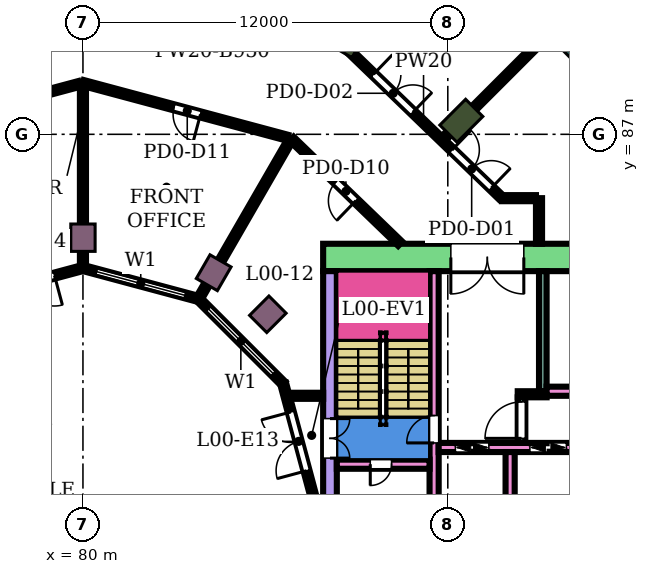
"""IFC4 building model, lengths in metres.
Left out: names, types, materials, properties, quantities, classifications, styles, units other than length and angle.
Written with IfcOpenShell. Run it as: python <this file> out.ifc"""

import sys

from ifc_helpers import new_model, si_unit, direction, frame, frame_2d, origin, origin_2d, place, context, subcontext, project, spatial, rectangle, extrude, element, fill, save


model = new_model("IFC4")
c1 = context("Model", 3, precision=1e-05, world=origin(), true_north=direction((0.0, 1.0)))
c2 = subcontext(c1, "Body", "Model", "MODEL_VIEW")
j1 = project(units=[si_unit("LENGTHUNIT", "METRE"), si_unit("PLANEANGLEUNIT", "RADIAN")], contexts=[c1])
p1 = place(None, origin())
s1 = spatial("IfcSite", under=j1, at=p1, CompositionType="ELEMENT")
p2 = place(p1, origin())
s2 = spatial("IfcBuilding", under=s1, at=p2, CompositionType="ELEMENT")
p3 = place(p2, origin())
s3 = spatial("IfcBuildingStorey", under=s2, at=p3, CompositionType="ELEMENT", Elevation=0.0)
for number, where, z_axis, x_axis in (
    (1, (92.445, 87.445, 0.0), (0.0, 0.0, 1.0), (0.707, 0.707, 0.0)),
    (2, (88.8, 90.242, 0.0), (0.0, 0.0, 1.0), (0.5, 0.866, 0.0)),
):
    element("IfcColumn", number, at=place(p3, frame(where, z_axis=z_axis, x_axis=x_axis)), inside=s3, PredefinedType="COLUMN", context=c2, shape_type="SweptSolid", body=[
        extrude(rectangle(XDim=1.2, YDim=0.8, at=origin_2d()), origin(), (0.0, 0.0, 1.0), 7.0),
    ])
for number, where, z_axis, x_axis in (
    (3, (86.081, 81.081, 0.0), (0.0, 0.0, 1.0), (0.707, 0.707, 0.0)),
    (4, (84.3, 82.448, 0.0), (0.0, 0.0, 1.0), (0.5, 0.866, 0.0)),
    (5, (80.0, 83.6, 0.0), (0.0, 0.0, 1.0), (0.0, 1.0, 0.0)),
):
    element("IfcColumn", number, at=place(p3, frame(where, z_axis=z_axis, x_axis=x_axis)), inside=s3, PredefinedType="COLUMN", context=c2, shape_type="SweptSolid", body=[
        extrude(rectangle(XDim=0.9, YDim=0.8, at=origin_2d()), origin(), (0.0, 0.0, 1.0), 7.0),
    ])
p4 = place(p3, frame((95.91, 90.91, 0.0), z_axis=(0.0, 0.0, 1.0), x_axis=(0.707106781187, 0.707106781187, 0.0)))
e6 = element("IfcColumn", 6, at=p4, inside=s3, PredefinedType="COLUMN", context=c2, shape_type="SweptSolid", body=[
    extrude(rectangle(XDim=1.8, YDim=2.4, at=origin_2d()), origin(), (0.0, 0.0, 1.0), 7.0),
])
p5 = place(p3, frame((87.9, 82.95, 0.0), z_axis=(0.0, 0.0, 1.0), x_axis=(1.0, 0.0, 0.0)))
e7 = element("IfcWall", 7, at=p5, inside=s3, PredefinedType="SHEAR", context=c2, shape_type="SweptSolid", body=[
    extrude(rectangle(XDim=14.6, YDim=0.9, at=frame_2d((7.3, 0.0))), origin(), (0.0, 0.0, 1.0), 6.55),
])
p6 = place(p5, frame((4.2, 0.0, 0.0)))
e8 = element("IfcOpeningElement", 8, at=p6, cuts=e7, PredefinedType="OPENING", context=c2, shape_type="SweptSolid", body=[
    extrude(rectangle(XDim=2.4, YDim=2.4, at=frame_2d((1.2, 1.2))), frame((0.0, 0.46, 0.0), z_axis=(0.0, -1.0, 0.0), x_axis=(1.0, 0.0, 0.0)), (0.0, 0.0, 1.0), 0.92),
])
p7 = place(p3, frame((88.125, 75.0, 0.0), z_axis=(0.0, 0.0, 1.0), x_axis=(0.0, 1.0, 0.0)))
e9 = element("IfcWall", 9, at=p7, inside=s3, PredefinedType="SHEAR", context=c2, shape_type="SweptSolid", body=[
    extrude(rectangle(XDim=7.5, YDim=0.45, at=frame_2d((3.75, 0.0))), origin(), (0.0, 0.0, 1.0), 6.55),
])
p8 = place(p7, frame((1.35, 0.0, 0.0)))
e10 = element("IfcOpeningElement", 10, at=p8, cuts=e9, PredefinedType="OPENING", context=c2, shape_type="SweptSolid", body=[
    extrude(rectangle(XDim=1.3, YDim=2.4, at=frame_2d((0.65, 1.2))), frame((0.0, 0.235, 0.0), z_axis=(0.0, -1.0, 0.0), x_axis=(1.0, 0.0, 0.0)), (0.0, 0.0, 1.0), 0.47),
])
p9 = place(p3, frame((91.55, 75.0, 0.0), z_axis=(0.0, 0.0, 1.0), x_axis=(0.0, 1.0, 0.0)))
e11 = element("IfcWall", 11, at=p9, inside=s3, PredefinedType="SHEAR", context=c2, shape_type="SweptSolid", body=[
    extrude(rectangle(XDim=7.5, YDim=0.3, at=frame_2d((3.75, 0.0))), origin(), (0.0, 0.0, 1.0), 6.55),
])
p10 = place(p9, frame((1.85, 0.0, 0.0)))
e12 = element("IfcOpeningElement", 12, at=p10, cuts=e11, PredefinedType="OPENING", context=c2, shape_type="SweptSolid", body=[
    extrude(rectangle(XDim=0.9, YDim=2.1, at=frame_2d((0.45, 1.05))), frame((0.0, 0.16, 0.0), z_axis=(0.0, -1.0, 0.0), x_axis=(1.0, 0.0, 0.0)), (0.0, 0.0, 1.0), 0.32),
])
p11 = place(p3, frame((88.35, 76.15, 0.0), z_axis=(0.0, 0.0, 1.0), x_axis=(1.0, 0.0, 0.0)))
e13 = element("IfcWall", 13, at=p11, inside=s3, PredefinedType="SHEAR", context=c2, shape_type="SweptSolid", body=[
    extrude(rectangle(XDim=3.05, YDim=0.3, at=frame_2d((1.525, 0.0))), origin(), (0.0, 0.0, 1.0), 6.55),
])
p12 = place(p11, frame((1.1, 0.0, 0.0)))
e14 = element("IfcOpeningElement", 14, at=p12, cuts=e13, PredefinedType="OPENING", context=c2, shape_type="SweptSolid", body=[
    extrude(rectangle(XDim=0.7, YDim=2.0, at=frame_2d((0.35, 1.0))), frame((0.0, 0.16, 0.0), z_axis=(0.0, -1.0, 0.0), x_axis=(1.0, 0.0, 0.0)), (0.0, 0.0, 1.0), 0.32),
])
p13 = place(p3, frame((91.7, 76.7, 0.0), z_axis=(0.0, 0.0, 1.0), x_axis=(1.0, 0.0, 0.0)))
e15 = element("IfcWall", 15, at=p13, inside=s3, PredefinedType="SHEAR", context=c2, shape_type="SweptSolid", body=[
    extrude(rectangle(XDim=10.8, YDim=0.3, at=frame_2d((5.4, 0.0))), origin(), (0.0, 0.0, 1.0), 6.55),
])
p14 = place(p13, frame((0.55, 0.0, 0.0)))
e16 = element("IfcOpeningElement", 16, at=p14, cuts=e15, PredefinedType="OPENING", context=c2, shape_type="SweptSolid", body=[
    extrude(rectangle(XDim=1.1, YDim=2.1, at=frame_2d((0.55, 1.05))), frame((0.0, 0.16, 0.0), z_axis=(0.0, -1.0, 0.0), x_axis=(1.0, 0.0, 0.0)), (0.0, 0.0, 1.0), 0.32),
])
p15 = place(p13, frame((3.0, 0.0, 0.0)))
e17 = element("IfcOpeningElement", 17, at=p15, cuts=e15, PredefinedType="OPENING", context=c2, shape_type="SweptSolid", body=[
    extrude(rectangle(XDim=1.2, YDim=2.1, at=frame_2d((0.6, 1.05))), frame((0.0, 0.16, 0.0), z_axis=(0.0, -1.0, 0.0), x_axis=(1.0, 0.0, 0.0)), (0.0, 0.0, 1.0), 0.32),
])
p16 = place(p13, frame((5.5, 0.0, 0.0)))
e18 = element("IfcOpeningElement", 18, at=p16, cuts=e15, PredefinedType="OPENING", context=c2, shape_type="SweptSolid", body=[
    extrude(rectangle(XDim=1.2, YDim=2.1, at=frame_2d((0.6, 1.05))), frame((0.0, 0.16, 0.0), z_axis=(0.0, -1.0, 0.0), x_axis=(1.0, 0.0, 0.0)), (0.0, 0.0, 1.0), 0.32),
])
p17 = place(p13, frame((8.1, 0.0, 0.0)))
e19 = element("IfcOpeningElement", 19, at=p17, cuts=e15, PredefinedType="OPENING", context=c2, shape_type="SweptSolid", body=[
    extrude(rectangle(XDim=1.0, YDim=2.1, at=frame_2d((0.5, 1.05))), frame((0.0, 0.16, 0.0), z_axis=(0.0, -1.0, 0.0), x_axis=(1.0, 0.0, 0.0)), (0.0, 0.0, 1.0), 0.32),
])
p18 = place(p3, frame((94.05, 74.0, 0.0), z_axis=(0.0, 0.0, 1.0), x_axis=(0.0, 1.0, 0.0)))
e20 = element("IfcWall", 20, at=p18, inside=s3, PredefinedType="SHEAR", context=c2, shape_type="SweptSolid", body=[
    extrude(rectangle(XDim=2.55, YDim=0.3, at=frame_2d((1.275, 0.0))), origin(), (0.0, 0.0, 1.0), 6.55),
])
p19 = place(p3, frame((95.125, 78.55, 0.0), z_axis=(0.0, 0.0, 1.0), x_axis=(0.0, 1.0, 0.0)))
e21 = element("IfcWall", 21, at=p19, inside=s3, PredefinedType="SHEAR", context=c2, shape_type="SweptSolid", body=[
    extrude(rectangle(XDim=3.95, YDim=0.25, at=frame_2d((1.975, 0.0))), origin(), (0.0, 0.0, 1.0), 6.55),
])
p20 = place(p3, frame((94.3, 78.45, 0.0), z_axis=(0.0, 0.0, 1.0), x_axis=(1.0, 0.0, 0.0)))
e22 = element("IfcWall", 22, at=p20, inside=s3, PredefinedType="SHEAR", context=c2, shape_type="SweptSolid", body=[
    extrude(rectangle(XDim=0.95, YDim=0.2, at=frame_2d((0.475, 0.0))), origin(), (0.0, 0.0, 1.0), 6.55),
])
p21 = place(p3, frame((94.425, 76.85, 0.0), z_axis=(0.0, 0.0, 1.0), x_axis=(0.0, 1.0, 0.0)))
e23 = element("IfcWall", 23, at=p21, inside=s3, PredefinedType="SHEAR", context=c2, shape_type="SweptSolid", body=[
    extrude(rectangle(XDim=1.5, YDim=0.25, at=frame_2d((0.75, 0.0))), origin(), (0.0, 0.0, 1.0), 6.55),
])
p22 = place(p21, frame((0.15, 0.0, 0.0)))
e24 = element("IfcOpeningElement", 24, at=p22, cuts=e23, PredefinedType="OPENING", context=c2, shape_type="SweptSolid", body=[
    extrude(rectangle(XDim=1.2, YDim=2.1, at=frame_2d((0.6, 1.05))), frame((0.0, 0.135, 0.0), z_axis=(0.0, -1.0, 0.0), x_axis=(1.0, 0.0, 0.0)), (0.0, 0.0, 1.0), 0.27),
])
p23 = place(p3, frame((95.25, 78.55, 0.0), z_axis=(0.0, 0.0, 1.0), x_axis=(1.0, 0.0, 0.0)))
e25 = element("IfcWall", 25, at=p23, inside=s3, PredefinedType="SHEAR", context=c2, shape_type="SweptSolid", body=[
    extrude(rectangle(XDim=7.25, YDim=0.3, at=frame_2d((3.625, 0.0))), origin(), (0.0, 0.0, 1.0), 6.55),
])
p24 = place(p23, frame((3.35, 0.0, 0.0)))
e26 = element("IfcOpeningElement", 26, at=p24, cuts=e25, PredefinedType="OPENING", context=c2, shape_type="SweptSolid", body=[
    extrude(rectangle(XDim=0.9, YDim=2.1, at=frame_2d((0.45, 1.05))), frame((0.0, 0.16, 0.0), z_axis=(0.0, -1.0, 0.0), x_axis=(1.0, 0.0, 0.0)), (0.0, 0.0, 1.0), 0.32),
])
p25 = place(p3, frame((87.604, 75.0, 0.0), z_axis=(0.0, 0.0, 1.0), x_axis=(-0.258789828301, 0.965933654434, 0.0)))
e27 = element("IfcWall", 27, at=p25, inside=s3, PredefinedType="NOTDEFINED", context=c2, shape_type="SweptSolid", body=[
    extrude(rectangle(XDim=3.936, YDim=0.2, at=frame_2d((1.968, 0.0))), origin(), (0.0, 0.0, 1.0), 7.0),
])
p26 = place(p25, frame((0.968, 0.0, 0.0)))
e28 = element("IfcOpeningElement", 28, at=p26, cuts=e27, PredefinedType="OPENING", context=c2, shape_type="SweptSolid", body=[
    extrude(rectangle(XDim=2.0, YDim=2.4, at=frame_2d((1.0, 1.2))), frame((0.0, 0.11, 0.0), z_axis=(0.0, -1.0, 0.0), x_axis=(1.0, 0.0, 0.0)), (0.0, 0.0, 1.0), 0.22),
])
p27 = place(p3, frame((86.585, 78.802, 0.0), z_axis=(0.0, 0.0, 1.0), x_axis=(-0.707106781187, 0.707106781187, 0.0)))
e29 = element("IfcWall", 29, at=p27, inside=s3, PredefinedType="NOTDEFINED", context=c2, shape_type="SweptSolid", body=[
    extrude(rectangle(XDim=3.936, YDim=0.2, at=frame_2d((1.968, 0.0))), origin(), (0.0, 0.0, 1.0), 7.0),
])
p28 = place(p27, frame((0.468, 0.0, 0.9)))
e30 = element("IfcOpeningElement", 30, at=p28, cuts=e29, PredefinedType="OPENING", context=c2, shape_type="SweptSolid", body=[
    extrude(rectangle(XDim=3.0, YDim=2.3, at=frame_2d((1.5, 1.15))), frame((0.0, 0.11, 0.0), z_axis=(0.0, -1.0, 0.0), x_axis=(1.0, 0.0, 0.0)), (0.0, 0.0, 1.0), 0.22),
])
p29 = place(p3, frame((83.802, 81.585, 0.0), z_axis=(0.0, 0.0, 1.0), x_axis=(-0.965933654434, 0.258789828301, 0.0)))
e31 = element("IfcWall", 31, at=p29, inside=s3, PredefinedType="NOTDEFINED", context=c2, shape_type="SweptSolid", body=[
    extrude(rectangle(XDim=3.936, YDim=0.2, at=frame_2d((1.968, 0.0))), origin(), (0.0, 0.0, 1.0), 7.0),
])
p30 = place(p29, frame((0.468, 0.0, 0.9)))
e32 = element("IfcOpeningElement", 32, at=p30, cuts=e31, PredefinedType="OPENING", context=c2, shape_type="SweptSolid", body=[
    extrude(rectangle(XDim=3.0, YDim=2.3, at=frame_2d((1.5, 1.15))), frame((0.0, 0.11, 0.0), z_axis=(0.0, -1.0, 0.0), x_axis=(1.0, 0.0, 0.0)), (0.0, 0.0, 1.0), 0.22),
])
p31 = place(p3, frame((80.0, 82.604, 0.0), z_axis=(0.0, 0.0, 1.0), x_axis=(-0.965933654434, -0.258789828301, 0.0)))
e33 = element("IfcWall", 33, at=p31, inside=s3, PredefinedType="NOTDEFINED", context=c2, shape_type="SweptSolid", body=[
    extrude(rectangle(XDim=3.936, YDim=0.2, at=frame_2d((1.968, 0.0))), origin(), (0.0, 0.0, 1.0), 7.0),
])
p32 = place(p31, frame((0.968, 0.0, 0.0)))
e34 = element("IfcOpeningElement", 34, at=p32, cuts=e33, PredefinedType="OPENING", context=c2, shape_type="SweptSolid", body=[
    extrude(rectangle(XDim=2.0, YDim=2.4, at=frame_2d((1.0, 1.2))), frame((0.0, 0.11, 0.0), z_axis=(0.0, -1.0, 0.0), x_axis=(1.0, 0.0, 0.0)), (0.0, 0.0, 1.0), 0.22),
])
p33 = place(p3, frame((73.284, 86.891, 0.0), z_axis=(0.0, 0.0, 1.0), x_axis=(0.965937351185, 0.258776029775, 0.0)))
e35 = element("IfcWall", 35, at=p33, inside=s3, PredefinedType="PARTITIONING", context=c2, shape_type="SweptSolid", body=[
    extrude(rectangle(XDim=6.823, YDim=0.2, at=frame_2d((3.412, 0.0))), origin(), (0.0, 0.0, 1.0), 6.55),
])
p34 = place(p33, frame((2.951, 0.0, 0.0)))
e36 = element("IfcOpeningElement", 36, at=p34, cuts=e35, PredefinedType="OPENING", context=c2, shape_type="SweptSolid", body=[
    extrude(rectangle(XDim=0.9, YDim=2.1, at=frame_2d((0.45, 1.05))), frame((0.0, 0.11, 0.0), z_axis=(0.0, -1.0, 0.0), x_axis=(1.0, 0.0, 0.0)), (0.0, 0.0, 1.0), 0.22),
])
p35 = place(p3, frame((80.0, 82.699, 0.0), z_axis=(0.0, 0.0, 1.0), x_axis=(0.0, 1.0, 0.0)))
e37 = element("IfcWall", 37, at=p35, inside=s3, PredefinedType="PARTITIONING", context=c2, shape_type="SweptSolid", body=[
    extrude(rectangle(XDim=5.861, YDim=0.2, at=frame_2d((2.931, 0.0))), origin(), (0.0, 0.0, 1.0), 6.55),
])
p36 = place(p3, frame((80.0, 88.69, 0.0), z_axis=(0.0, 0.0, 1.0), x_axis=(0.965929896633, -0.258803853893, 0.0)))
e38 = element("IfcWall", 38, at=p36, inside=s3, PredefinedType="PARTITIONING", context=c2, shape_type="SweptSolid", body=[
    extrude(rectangle(XDim=6.963, YDim=0.2, at=frame_2d((3.481, 0.0))), origin(), (0.0, 0.0, 1.0), 6.55),
])
p37 = place(p36, frame((3.102, 0.0, 0.0)))
e39 = element("IfcOpeningElement", 39, at=p37, cuts=e38, PredefinedType="OPENING", context=c2, shape_type="SweptSolid", body=[
    extrude(rectangle(XDim=0.9, YDim=2.1, at=frame_2d((0.45, 1.05))), frame((0.0, 0.11, 0.0), z_axis=(0.0, -1.0, 0.0), x_axis=(1.0, 0.0, 0.0)), (0.0, 0.0, 1.0), 0.22),
])
p38 = place(p3, frame((83.85, 81.667, 0.0), z_axis=(0.0, 0.0, 1.0), x_axis=(0.500029580911, 0.866008324564, 0.0)))
e40 = element("IfcWall", 40, at=p38, inside=s3, PredefinedType="PARTITIONING", context=c2, shape_type="SweptSolid", body=[
    extrude(rectangle(XDim=5.872, YDim=0.2, at=frame_2d((2.936, 0.0))), origin(), (0.0, 0.0, 1.0), 6.55),
])
p39 = place(p3, frame((86.861, 86.852, 0.0), z_axis=(0.0, 0.0, 1.0), x_axis=(0.719448855188, -0.694545423114, 0.0)))
e41 = element("IfcWall", 41, at=p39, inside=s3, PredefinedType="PARTITIONING", context=c2, shape_type="SweptSolid", body=[
    extrude(rectangle(XDim=4.97, YDim=0.2, at=frame_2d((2.485, 0.0))), origin(), (0.0, 0.0, 1.0), 6.55),
])
p40 = place(p39, frame((2.035, 0.0, 0.0)))
e42 = element("IfcOpeningElement", 42, at=p40, cuts=e41, PredefinedType="OPENING", context=c2, shape_type="SweptSolid", body=[
    extrude(rectangle(XDim=0.9, YDim=2.1, at=frame_2d((0.45, 1.05))), frame((0.0, 0.11, 0.0), z_axis=(0.0, -1.0, 0.0), x_axis=(1.0, 0.0, 0.0)), (0.0, 0.0, 1.0), 0.22),
])
p41 = place(p3, frame((88.668, 89.832, 0.0), z_axis=(0.0, 0.0, 1.0), x_axis=(0.71956091863, -0.694429322811, 0.0)))
e43 = element("IfcWall", 43, at=p41, inside=s3, PredefinedType="PARTITIONING", context=c2, shape_type="SweptSolid", body=[
    extrude(rectangle(XDim=7.043, YDim=0.2, at=frame_2d((3.521, 0.0))), origin(), (0.0, 0.0, 1.0), 6.55),
])
p42 = place(p41, frame((4.821, 0.0, 0.0)))
e44 = element("IfcOpeningElement", 44, at=p42, cuts=e43, PredefinedType="OPENING", context=c2, shape_type="SweptSolid", body=[
    extrude(rectangle(XDim=1.8, YDim=2.1, at=frame_2d((0.9, 1.05))), frame((0.0, 0.11, 0.0), z_axis=(0.0, -1.0, 0.0), x_axis=(1.0, 0.0, 0.0)), (0.0, 0.0, 1.0), 0.22),
])
p43 = place(p41, frame((1.234, 0.0, 0.0)))
e45 = element("IfcOpeningElement", 45, at=p43, cuts=e43, PredefinedType="OPENING", context=c2, shape_type="SweptSolid", body=[
    extrude(rectangle(XDim=1.8, YDim=2.1, at=frame_2d((0.9, 1.05))), frame((0.0, 0.11, 0.0), z_axis=(0.0, -1.0, 0.0), x_axis=(1.0, 0.0, 0.0)), (0.0, 0.0, 1.0), 0.22),
])
p44 = place(p3, frame((91.876, 86.876, 0.0), z_axis=(0.0, 0.0, 1.0), x_axis=(0.707106781187, 0.707106781187, 0.0)))
e46 = element("IfcWall", 46, at=p44, inside=s3, PredefinedType="PARTITIONING", context=c2, shape_type="SweptSolid", body=[
    extrude(rectangle(XDim=29.004, YDim=0.2, at=frame_2d((14.502, 0.0))), origin(), (0.0, 0.0, 1.0), 5.65),
])
p45 = place(p3, frame((93.78, 84.9, 0.0), z_axis=(0.0, 0.0, 1.0), x_axis=(1.0, 0.0, 0.0)))
e47 = element("IfcWall", 47, at=p45, inside=s3, PredefinedType="PARTITIONING", context=c2, shape_type="SweptSolid", body=[
    extrude(rectangle(XDim=1.12, YDim=0.2, at=frame_2d((0.56, 0.0))), origin(), (0.0, 0.0, 1.0), 6.55),
])
p46 = place(p3, frame((95.0, 83.401, 0.0), z_axis=(0.0, 0.0, 1.0), x_axis=(0.0, 1.0, 0.0)))
e48 = element("IfcWall", 48, at=p46, inside=s3, PredefinedType="PARTITIONING", context=c2, shape_type="SweptSolid", body=[
    extrude(rectangle(XDim=1.499, YDim=0.2, at=frame_2d((0.75, 0.0))), origin(), (0.0, 0.0, 1.0), 6.55),
])
p47 = place(p3, frame((86.796, 78.4, 0.0), z_axis=(0.0, 0.0, 1.0), x_axis=(1.0, 0.0, 0.0)))
e49 = element("IfcWall", 49, at=p47, inside=s3, PredefinedType="PARTITIONING", context=c2, shape_type="SweptSolid", body=[
    extrude(rectangle(XDim=1.104, YDim=0.2, at=frame_2d((0.552, 0.0))), origin(), (0.0, 0.0, 1.0), 6.55),
])
p48 = place(p26, origin())
e50 = element("IfcDoor", 50, at=p48, inside=s3, OperationType="DOUBLE_DOOR_SINGLE_SWING", PredefinedType="DOOR", context=c2, shape_type="SweptSolid", body=[
    extrude(rectangle(XDim=2.0, YDim=2.4, at=frame_2d((1.0, 1.2))), frame((0.0, 0.025, 0.0), z_axis=(0.0, -1.0, 0.0), x_axis=(1.0, 0.0, 0.0)), (0.0, 0.0, 1.0), 0.05),
])
fill(e28, e50)
p49 = place(p28, origin())
e51 = element("IfcWindow", 51, at=p49, inside=s3, PartitioningType="SINGLE_PANEL", PredefinedType="WINDOW", context=c2, shape_type="SweptSolid", body=[
    extrude(rectangle(XDim=3.0, YDim=2.3, at=frame_2d((1.5, 1.15))), frame((0.0, 0.03, 0.0), z_axis=(0.0, -1.0, 0.0), x_axis=(1.0, 0.0, 0.0)), (0.0, 0.0, 1.0), 0.06),
])
fill(e30, e51)
p50 = place(p30, origin())
e52 = element("IfcWindow", 52, at=p50, inside=s3, PartitioningType="SINGLE_PANEL", PredefinedType="WINDOW", context=c2, shape_type="SweptSolid", body=[
    extrude(rectangle(XDim=3.0, YDim=2.3, at=frame_2d((1.5, 1.15))), frame((0.0, 0.03, 0.0), z_axis=(0.0, -1.0, 0.0), x_axis=(1.0, 0.0, 0.0)), (0.0, 0.0, 1.0), 0.06),
])
fill(e32, e52)
p51 = place(p32, origin())
e53 = element("IfcDoor", 53, at=p51, inside=s3, OperationType="DOUBLE_DOOR_SINGLE_SWING", PredefinedType="DOOR", context=c2, shape_type="SweptSolid", body=[
    extrude(rectangle(XDim=2.0, YDim=2.4, at=frame_2d((1.0, 1.2))), frame((0.0, 0.025, 0.0), z_axis=(0.0, -1.0, 0.0), x_axis=(1.0, 0.0, 0.0)), (0.0, 0.0, 1.0), 0.05),
])
fill(e34, e53)
p52 = place(p42, origin())
e54 = element("IfcDoor", 54, at=p52, inside=s3, OperationType="DOUBLE_DOOR_SINGLE_SWING", PredefinedType="DOOR", context=c2, shape_type="SweptSolid", body=[
    extrude(rectangle(XDim=1.8, YDim=2.1, at=frame_2d((0.9, 1.05))), frame((0.0, 0.025, 0.0), z_axis=(0.0, -1.0, 0.0), x_axis=(1.0, 0.0, 0.0)), (0.0, 0.0, 1.0), 0.05),
])
fill(e44, e54)
p53 = place(p43, origin())
e55 = element("IfcDoor", 55, at=p53, inside=s3, OperationType="DOUBLE_DOOR_SINGLE_SWING", PredefinedType="DOOR", context=c2, shape_type="SweptSolid", body=[
    extrude(rectangle(XDim=1.8, YDim=2.1, at=frame_2d((0.9, 1.05))), frame((0.0, 0.025, 0.0), z_axis=(0.0, -1.0, 0.0), x_axis=(1.0, 0.0, 0.0)), (0.0, 0.0, 1.0), 0.05),
])
fill(e45, e55)
p54 = place(p40, frame((0.9, 0.0, 0.0), z_axis=(0.0, 0.0, 1.0), x_axis=(-1.0, 0.0, 0.0)))
e56 = element("IfcDoor", 56, at=p54, inside=s3, OperationType="SINGLE_SWING_LEFT", PredefinedType="DOOR", context=c2, shape_type="SweptSolid", body=[
    extrude(rectangle(XDim=0.9, YDim=2.1, at=frame_2d((0.45, 1.05))), frame((0.0, 0.025, 0.0), z_axis=(0.0, -1.0, 0.0), x_axis=(1.0, 0.0, 0.0)), (0.0, 0.0, 1.0), 0.05),
])
fill(e42, e56)
p55 = place(p37, frame((0.9, 0.0, 0.0), z_axis=(0.0, 0.0, 1.0), x_axis=(-1.0, 0.0, 0.0)))
e57 = element("IfcDoor", 57, at=p55, inside=s3, OperationType="SINGLE_SWING_LEFT", PredefinedType="DOOR", context=c2, shape_type="SweptSolid", body=[
    extrude(rectangle(XDim=0.9, YDim=2.1, at=frame_2d((0.45, 1.05))), frame((0.0, 0.025, 0.0), z_axis=(0.0, -1.0, 0.0), x_axis=(1.0, 0.0, 0.0)), (0.0, 0.0, 1.0), 0.05),
])
fill(e39, e57)
p56 = place(p12, frame((0.7, 0.0, 0.0), z_axis=(0.0, 0.0, 1.0), x_axis=(-1.0, 0.0, 0.0)))
e58 = element("IfcDoor", 58, at=p56, inside=s3, OperationType="SINGLE_SWING_RIGHT", PredefinedType="DOOR", context=c2, shape_type="SweptSolid", body=[
    extrude(rectangle(XDim=0.7, YDim=2.0, at=frame_2d((0.35, 1.0))), frame((0.0, 0.025, 0.0), z_axis=(0.0, -1.0, 0.0), x_axis=(1.0, 0.0, 0.0)), (0.0, 0.0, 1.0), 0.05),
])
fill(e14, e58)
p57 = place(p10, origin())
e59 = element("IfcDoor", 59, at=p57, inside=s3, OperationType="SINGLE_SWING_LEFT", PredefinedType="DOOR", context=c2, shape_type="SweptSolid", body=[
    extrude(rectangle(XDim=0.9, YDim=2.1, at=frame_2d((0.45, 1.05))), frame((0.0, 0.025, 0.0), z_axis=(0.0, -1.0, 0.0), x_axis=(1.0, 0.0, 0.0)), (0.0, 0.0, 1.0), 0.05),
])
fill(e12, e59)
p58 = place(p8, frame((1.3, 0.0, 0.0), z_axis=(0.0, 0.0, 1.0), x_axis=(-1.0, 0.0, 0.0)))
e60 = element("IfcDoor", 60, at=p58, inside=s3, OperationType="DOUBLE_DOOR_SINGLE_SWING", PredefinedType="DOOR", context=c2, shape_type="SweptSolid", body=[
    extrude(rectangle(XDim=1.3, YDim=2.4, at=frame_2d((0.65, 1.2))), frame((0.0, 0.025, 0.0), z_axis=(0.0, -1.0, 0.0), x_axis=(1.0, 0.0, 0.0)), (0.0, 0.0, 1.0), 0.05),
])
fill(e10, e60)
p59 = place(p14, origin())
e61 = element("IfcDoor", 61, at=p59, inside=s3, OperationType="DOUBLE_DOOR_SLIDING", PredefinedType="DOOR", context=c2, shape_type="SweptSolid", body=[
    extrude(rectangle(XDim=1.1, YDim=2.1, at=frame_2d((0.55, 1.05))), frame((0.0, 0.025, 0.0), z_axis=(0.0, -1.0, 0.0), x_axis=(1.0, 0.0, 0.0)), (0.0, 0.0, 1.0), 0.05),
])
fill(e16, e61)
p60 = place(p15, origin())
e62 = element("IfcDoor", 62, at=p60, inside=s3, OperationType="DOUBLE_DOOR_SLIDING", PredefinedType="DOOR", context=c2, shape_type="SweptSolid", body=[
    extrude(rectangle(XDim=1.2, YDim=2.1, at=frame_2d((0.6, 1.05))), frame((0.0, 0.025, 0.0), z_axis=(0.0, -1.0, 0.0), x_axis=(1.0, 0.0, 0.0)), (0.0, 0.0, 1.0), 0.05),
])
fill(e17, e62)
p61 = place(p22, origin())
e63 = element("IfcDoor", 63, at=p61, inside=s3, OperationType="SINGLE_SWING_LEFT", PredefinedType="DOOR", context=c2, shape_type="SweptSolid", body=[
    extrude(rectangle(XDim=1.2, YDim=2.1, at=frame_2d((0.6, 1.05))), frame((0.0, 0.025, 0.0), z_axis=(0.0, -1.0, 0.0), x_axis=(1.0, 0.0, 0.0)), (0.0, 0.0, 1.0), 0.05),
])
fill(e24, e63)
p62 = place(p6, frame((2.4, 0.0, 0.0), z_axis=(0.0, 0.0, 1.0), x_axis=(-1.0, 0.0, 0.0)))
e64 = element("IfcDoor", 64, at=p62, inside=s3, OperationType="DOUBLE_DOOR_SINGLE_SWING", PredefinedType="DOOR", context=c2, shape_type="SweptSolid", body=[
    extrude(rectangle(XDim=2.4, YDim=2.4, at=frame_2d((1.2, 1.2))), frame((0.0, 0.025, 0.0), z_axis=(0.0, -1.0, 0.0), x_axis=(1.0, 0.0, 0.0)), (0.0, 0.0, 1.0), 0.05),
])
fill(e8, e64)
save(model, sys.argv[1])
